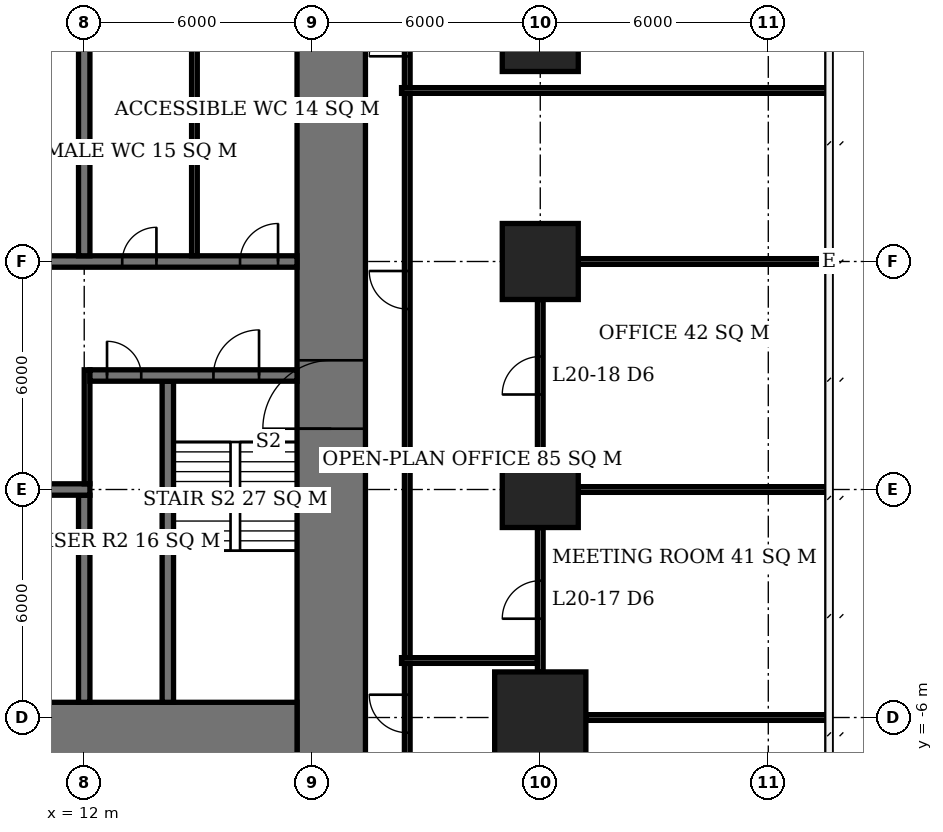
"""IFC4 building model, lengths in metres.
Left out: names, types, materials, properties, quantities, classifications, styles, units other than length and angle.
Written with IfcOpenShell. Run it as: python <this file> out.ifc"""

import sys

from ifc_helpers import new_model, si_unit, direction, frame, frame_2d, origin, origin_2d, place, context, subcontext, project, spatial, rectangle, extrude, element, fill, save


model = new_model("IFC4")
c1 = context("Model", 3, precision=1e-05, world=origin(), true_north=direction((0.0, 1.0)))
c2 = subcontext(c1, "Body", "Model", "MODEL_VIEW")
j1 = project(units=[si_unit("LENGTHUNIT", "METRE"), si_unit("PLANEANGLEUNIT", "RADIAN")], contexts=[c1])
p1 = place(None, origin())
s1 = spatial("IfcSite", under=j1, at=p1, CompositionType="ELEMENT")
p2 = place(p1, origin())
s2 = spatial("IfcBuilding", under=s1, at=p2, CompositionType="ELEMENT")
p3 = place(p2, frame((0.0, 0.0, 84.5)))
s3 = spatial("IfcBuildingStorey", under=s2, at=p3, CompositionType="ELEMENT", Elevation=84.5)
p4 = place(p3, frame((24.0, -6.0, 0.0), z_axis=(0.0, 0.0, 1.0), x_axis=(1.0, 0.0, 0.0)))
e1 = element("IfcColumn", 1, at=p4, inside=s3, PredefinedType="COLUMN", context=c2, shape_type="SweptSolid", body=[
    extrude(rectangle(XDim=2.4, YDim=2.4, at=origin_2d()), origin(), (0.0, 0.0, 1.0), 3.9),
])
for number, where, z_axis, x_axis in (
    (2, (24.0, 0.0, 0.0), (0.0, 0.0, 1.0), (1.0, 0.0, 0.0)),
    (3, (24.0, 6.0, 0.0), (0.0, 0.0, 1.0), (1.0, 0.0, 0.0)),
    (4, (24.0, 12.0, 0.0), (0.0, 0.0, 1.0), (1.0, 0.0, 0.0)),
):
    element("IfcColumn", number, at=place(p3, frame(where, z_axis=z_axis, x_axis=x_axis)), inside=s3, PredefinedType="COLUMN", context=c2, shape_type="SweptSolid", body=[
        extrude(rectangle(XDim=2.0, YDim=2.0, at=origin_2d()), origin(), (0.0, 0.0, 1.0), 3.9),
    ])
p5 = place(p3, frame((-5.6, -6.6, 0.0), z_axis=(0.0, 0.0, 1.0), x_axis=(1.0, 0.0, 0.0)))
e5 = element("IfcWall", 5, at=p5, inside=s3, PredefinedType="SHEAR", context=c2, shape_type="SweptSolid", body=[
    extrude(rectangle(XDim=23.2, YDim=2.0, at=frame_2d((11.6, 0.0))), origin(), (0.0, 0.0, 1.0), 3.9),
])
p6 = place(p3, frame((18.5, -7.6, 0.0), z_axis=(0.0, 0.0, 1.0), x_axis=(0.0, 1.0, 0.0)))
e6 = element("IfcWall", 6, at=p6, inside=s3, PredefinedType="SHEAR", context=c2, shape_type="SweptSolid", body=[
    extrude(rectangle(XDim=21.2, YDim=1.8, at=frame_2d((10.6, 0.0))), origin(), (0.0, 0.0, 1.0), 3.9),
])
p7 = place(p6, frame((9.2, 0.0, 0.0)))
e7 = element("IfcOpeningElement", 7, at=p7, cuts=e6, PredefinedType="OPENING", context=c2, shape_type="SweptSolid", body=[
    extrude(rectangle(XDim=1.8, YDim=2.4, at=frame_2d((0.9, 1.2))), frame((0.0, 0.91, 0.0), z_axis=(0.0, -1.0, 0.0), x_axis=(1.0, 0.0, 0.0)), (0.0, 0.0, 1.0), 1.82),
])
p8 = place(p3, frame((-5.6, 0.0, 0.0), z_axis=(0.0, 0.0, 1.0), x_axis=(1.0, 0.0, 0.0)))
e8 = element("IfcWall", 8, at=p8, inside=s3, PredefinedType="SHEAR", context=c2, shape_type="SweptSolid", body=[
    extrude(rectangle(XDim=17.75, YDim=0.3, at=frame_2d((8.875, 0.0))), origin(), (0.0, 0.0, 1.0), 3.9),
])
p9 = place(p8, frame((0.6, 0.0, 0.0)))
e9 = element("IfcOpeningElement", 9, at=p9, cuts=e8, PredefinedType="OPENING", context=c2, shape_type="SweptSolid", body=[
    extrude(rectangle(XDim=0.9, YDim=2.1, at=frame_2d((0.45, 1.05))), frame((0.0, 0.16, 0.0), z_axis=(0.0, -1.0, 0.0), x_axis=(1.0, 0.0, 0.0)), (0.0, 0.0, 1.0), 0.32),
])
p10 = place(p8, frame((3.7, 0.0, 0.0)))
e10 = element("IfcOpeningElement", 10, at=p10, cuts=e8, PredefinedType="OPENING", context=c2, shape_type="SweptSolid", body=[
    extrude(rectangle(XDim=1.0, YDim=2.1, at=frame_2d((0.5, 1.05))), frame((0.0, 0.16, 0.0), z_axis=(0.0, -1.0, 0.0), x_axis=(1.0, 0.0, 0.0)), (0.0, 0.0, 1.0), 0.32),
])
p11 = place(p3, frame((12.15, 3.0, 0.0), z_axis=(0.0, 0.0, 1.0), x_axis=(1.0, 0.0, 0.0)))
e11 = element("IfcWall", 11, at=p11, inside=s3, PredefinedType="SHEAR", context=c2, shape_type="SweptSolid", body=[
    extrude(rectangle(XDim=5.45, YDim=0.3, at=frame_2d((2.725, 0.0))), origin(), (0.0, 0.0, 1.0), 3.9),
])
p12 = place(p11, frame((3.25, 0.0, 0.0)))
e12 = element("IfcOpeningElement", 12, at=p12, cuts=e11, PredefinedType="OPENING", context=c2, shape_type="SweptSolid", body=[
    extrude(rectangle(XDim=1.2, YDim=2.1, at=frame_2d((0.6, 1.05))), frame((0.0, 0.16, 0.0), z_axis=(0.0, -1.0, 0.0), x_axis=(1.0, 0.0, 0.0)), (0.0, 0.0, 1.0), 0.32),
])
p13 = place(p11, frame((0.45, 0.0, 0.0)))
e13 = element("IfcOpeningElement", 13, at=p13, cuts=e11, PredefinedType="OPENING", context=c2, shape_type="SweptSolid", body=[
    extrude(rectangle(XDim=0.9, YDim=2.1, at=frame_2d((0.45, 1.05))), frame((0.0, 0.16, 0.0), z_axis=(0.0, -1.0, 0.0), x_axis=(1.0, 0.0, 0.0)), (0.0, 0.0, 1.0), 0.32),
])
p14 = place(p3, frame((-0.15, 6.0, 0.0), z_axis=(0.0, 0.0, 1.0), x_axis=(1.0, 0.0, 0.0)))
e14 = element("IfcWall", 14, at=p14, inside=s3, PredefinedType="SHEAR", context=c2, shape_type="SweptSolid", body=[
    extrude(rectangle(XDim=17.75, YDim=0.3, at=frame_2d((8.875, 0.0))), origin(), (0.0, 0.0, 1.0), 3.9),
])
p15 = place(p14, frame((13.15, 0.0, 0.0)))
e15 = element("IfcOpeningElement", 15, at=p15, cuts=e14, PredefinedType="OPENING", context=c2, shape_type="SweptSolid", body=[
    extrude(rectangle(XDim=0.9, YDim=2.1, at=frame_2d((0.45, 1.05))), frame((0.0, 0.16, 0.0), z_axis=(0.0, -1.0, 0.0), x_axis=(1.0, 0.0, 0.0)), (0.0, 0.0, 1.0), 0.32),
])
p16 = place(p14, frame((16.25, 0.0, 0.0)))
e16 = element("IfcOpeningElement", 16, at=p16, cuts=e14, PredefinedType="OPENING", context=c2, shape_type="SweptSolid", body=[
    extrude(rectangle(XDim=1.0, YDim=2.1, at=frame_2d((0.5, 1.05))), frame((0.0, 0.16, 0.0), z_axis=(0.0, -1.0, 0.0), x_axis=(1.0, 0.0, 0.0)), (0.0, 0.0, 1.0), 0.32),
])
p17 = place(p14, frame((1.1, 0.0, 0.0)))
e17 = element("IfcOpeningElement", 17, at=p17, cuts=e14, PredefinedType="OPENING", context=c2, shape_type="SweptSolid", body=[
    extrude(rectangle(XDim=1.1, YDim=2.1, at=frame_2d((0.55, 1.05))), frame((0.0, 0.16, 0.0), z_axis=(0.0, -1.0, 0.0), x_axis=(1.0, 0.0, 0.0)), (0.0, 0.0, 1.0), 0.32),
])
p18 = place(p14, frame((4.1, 0.0, 0.0)))
e18 = element("IfcOpeningElement", 18, at=p18, cuts=e14, PredefinedType="OPENING", context=c2, shape_type="SweptSolid", body=[
    extrude(rectangle(XDim=1.1, YDim=2.1, at=frame_2d((0.55, 1.05))), frame((0.0, 0.16, 0.0), z_axis=(0.0, -1.0, 0.0), x_axis=(1.0, 0.0, 0.0)), (0.0, 0.0, 1.0), 0.32),
])
p19 = place(p14, frame((7.1, 0.0, 0.0)))
e19 = element("IfcOpeningElement", 19, at=p19, cuts=e14, PredefinedType="OPENING", context=c2, shape_type="SweptSolid", body=[
    extrude(rectangle(XDim=1.1, YDim=2.1, at=frame_2d((0.55, 1.05))), frame((0.0, 0.16, 0.0), z_axis=(0.0, -1.0, 0.0), x_axis=(1.0, 0.0, 0.0)), (0.0, 0.0, 1.0), 0.32),
])
p20 = place(p14, frame((10.1, 0.0, 0.0)))
e20 = element("IfcOpeningElement", 20, at=p20, cuts=e14, PredefinedType="OPENING", context=c2, shape_type="SweptSolid", body=[
    extrude(rectangle(XDim=1.1, YDim=2.1, at=frame_2d((0.55, 1.05))), frame((0.0, 0.16, 0.0), z_axis=(0.0, -1.0, 0.0), x_axis=(1.0, 0.0, 0.0)), (0.0, 0.0, 1.0), 0.32),
])
for number, where, z_axis, x_axis in (
    (21, (12.0, -5.6, 0.0), (0.0, 0.0, 1.0), (0.0, 1.0, 0.0)),
    (22, (12.0, 6.15, 0.0), (0.0, 0.0, 1.0), (0.0, 1.0, 0.0)),
):
    element("IfcWall", number, at=place(p3, frame(where, z_axis=z_axis, x_axis=x_axis)), inside=s3, PredefinedType="SHEAR", context=c2, shape_type="SweptSolid", body=[
        extrude(rectangle(XDim=5.45, YDim=0.3, at=frame_2d((2.725, 0.0))), origin(), (0.0, 0.0, 1.0), 3.9),
    ])
p21 = place(p3, frame((14.2, -5.6, 0.0), z_axis=(0.0, 0.0, 1.0), x_axis=(0.0, 1.0, 0.0)))
e23 = element("IfcWall", 23, at=p21, inside=s3, PredefinedType="SHEAR", context=c2, shape_type="SweptSolid", body=[
    extrude(rectangle(XDim=8.45, YDim=0.3, at=frame_2d((4.225, 0.0))), origin(), (0.0, 0.0, 1.0), 3.9),
])
p22 = place(p3, frame((14.9, 6.15, 0.0), z_axis=(0.0, 0.0, 1.0), x_axis=(0.0, 1.0, 0.0)))
e24 = element("IfcWall", 24, at=p22, inside=s3, PredefinedType="PLUMBINGWALL", context=c2, shape_type="SweptSolid", body=[
    extrude(rectangle(XDim=5.45, YDim=0.15, at=frame_2d((2.725, 0.0))), origin(), (0.0, 0.0, 1.0), 3.65),
])
p23 = place(p3, frame((25.2, -6.0, 0.0), z_axis=(0.0, 0.0, 1.0), x_axis=(1.0, 0.0, 0.0)))
e25 = element("IfcWall", 25, at=p23, inside=s3, PredefinedType="PARTITIONING", context=c2, shape_type="SweptSolid", body=[
    extrude(rectangle(XDim=6.4, YDim=0.15, at=frame_2d((3.2, 0.0))), origin(), (0.0, 0.0, 1.0), 3.65),
])
p24 = place(p3, frame((25.0, 0.0, 0.0), z_axis=(0.0, 0.0, 1.0), x_axis=(1.0, 0.0, 0.0)))
e26 = element("IfcWall", 26, at=p24, inside=s3, PredefinedType="PARTITIONING", context=c2, shape_type="SweptSolid", body=[
    extrude(rectangle(XDim=6.6, YDim=0.15, at=frame_2d((3.3, 0.0))), origin(), (0.0, 0.0, 1.0), 3.65),
])
p25 = place(p3, frame((25.0, 6.0, 0.0), z_axis=(0.0, 0.0, 1.0), x_axis=(1.0, 0.0, 0.0)))
e27 = element("IfcWall", 27, at=p25, inside=s3, PredefinedType="PARTITIONING", context=c2, shape_type="SweptSolid", body=[
    extrude(rectangle(XDim=6.55, YDim=0.15, at=frame_2d((3.275, 0.0))), origin(), (0.0, 0.0, 1.0), 3.65),
])
p26 = place(p3, frame((24.0, -4.8, 0.0), z_axis=(0.0, 0.0, 1.0), x_axis=(0.0, 1.0, 0.0)))
e28 = element("IfcWall", 28, at=p26, inside=s3, PredefinedType="PARTITIONING", context=c2, shape_type="SweptSolid", body=[
    extrude(rectangle(XDim=3.8, YDim=0.15, at=frame_2d((1.9, 0.0))), origin(), (0.0, 0.0, 1.0), 3.65),
])
p27 = place(p26, frame((1.4, 0.0, 0.0)))
e29 = element("IfcOpeningElement", 29, at=p27, cuts=e28, PredefinedType="OPENING", context=c2, shape_type="SweptSolid", body=[
    extrude(rectangle(XDim=1.0, YDim=2.1, at=frame_2d((0.5, 1.05))), frame((0.0, 0.085, 0.0), z_axis=(0.0, -1.0, 0.0), x_axis=(1.0, 0.0, 0.0)), (0.0, 0.0, 1.0), 0.17),
])
p28 = place(p3, frame((24.0, 1.0, 0.0), z_axis=(0.0, 0.0, 1.0), x_axis=(0.0, 1.0, 0.0)))
e30 = element("IfcWall", 30, at=p28, inside=s3, PredefinedType="PARTITIONING", context=c2, shape_type="SweptSolid", body=[
    extrude(rectangle(XDim=4.0, YDim=0.15, at=frame_2d((2.0, 0.0))), origin(), (0.0, 0.0, 1.0), 3.65),
])
p29 = place(p28, frame((1.5, 0.0, 0.0)))
e31 = element("IfcOpeningElement", 31, at=p29, cuts=e30, PredefinedType="OPENING", context=c2, shape_type="SweptSolid", body=[
    extrude(rectangle(XDim=1.0, YDim=2.1, at=frame_2d((0.5, 1.05))), frame((0.0, 0.085, 0.0), z_axis=(0.0, -1.0, 0.0), x_axis=(1.0, 0.0, 0.0)), (0.0, 0.0, 1.0), 0.17),
])
p30 = place(p3, frame((20.5, -8.425, 0.0), z_axis=(0.0, 0.0, 1.0), x_axis=(0.0, 1.0, 0.0)))
e32 = element("IfcWall", 32, at=p30, inside=s3, PredefinedType="PARTITIONING", context=c2, shape_type="SweptSolid", body=[
    extrude(rectangle(XDim=3.85, YDim=0.15, at=frame_2d((1.925, 0.0))), origin(), (0.0, 0.0, 1.0), 3.65),
])
p31 = place(p30, frame((2.025, 0.0, 0.0)))
e33 = element("IfcOpeningElement", 33, at=p31, cuts=e32, PredefinedType="OPENING", context=c2, shape_type="SweptSolid", body=[
    extrude(rectangle(XDim=1.0, YDim=2.1, at=frame_2d((0.5, 1.05))), frame((0.0, 0.085, 0.0), z_axis=(0.0, -1.0, 0.0), x_axis=(1.0, 0.0, 0.0)), (0.0, 0.0, 1.0), 0.17),
])
p32 = place(p3, frame((20.5, -4.425, 0.0), z_axis=(0.0, 0.0, 1.0), x_axis=(0.0, 1.0, 0.0)))
e34 = element("IfcWall", 34, at=p32, inside=s3, PredefinedType="PARTITIONING", context=c2, shape_type="SweptSolid", body=[
    extrude(rectangle(XDim=14.85, YDim=0.15, at=frame_2d((7.425, 0.0))), origin(), (0.0, 0.0, 1.0), 3.65),
])
p33 = place(p32, frame((9.175, 0.0, 0.0)))
e35 = element("IfcOpeningElement", 35, at=p33, cuts=e34, PredefinedType="OPENING", context=c2, shape_type="SweptSolid", body=[
    extrude(rectangle(XDim=1.0, YDim=2.1, at=frame_2d((0.5, 1.05))), frame((0.0, 0.085, 0.0), z_axis=(0.0, -1.0, 0.0), x_axis=(1.0, 0.0, 0.0)), (0.0, 0.0, 1.0), 0.17),
])
p34 = place(p3, frame((20.35, -4.5, 0.0), z_axis=(0.0, 0.0, 1.0), x_axis=(1.0, 0.0, 0.0)))
e36 = element("IfcWall", 36, at=p34, inside=s3, PredefinedType="PARTITIONING", context=c2, shape_type="SweptSolid", body=[
    extrude(rectangle(XDim=3.575, YDim=0.15, at=frame_2d((1.788, 0.0))), origin(), (0.0, 0.0, 1.0), 3.65),
])
p35 = place(p3, frame((20.5, 10.575, 0.0), z_axis=(0.0, 0.0, 1.0), x_axis=(0.0, 1.0, 0.0)))
e37 = element("IfcWall", 37, at=p35, inside=s3, PredefinedType="PARTITIONING", context=c2, shape_type="SweptSolid", body=[
    extrude(rectangle(XDim=3.85, YDim=0.15, at=frame_2d((1.925, 0.0))), origin(), (0.0, 0.0, 1.0), 3.65),
])
p36 = place(p35, frame((0.825, 0.0, 0.0)))
e38 = element("IfcOpeningElement", 38, at=p36, cuts=e37, PredefinedType="OPENING", context=c2, shape_type="SweptSolid", body=[
    extrude(rectangle(XDim=1.0, YDim=2.1, at=frame_2d((0.5, 1.05))), frame((0.0, 0.085, 0.0), z_axis=(0.0, -1.0, 0.0), x_axis=(1.0, 0.0, 0.0)), (0.0, 0.0, 1.0), 0.17),
])
p37 = place(p3, frame((20.35, 10.5, 0.0), z_axis=(0.0, 0.0, 1.0), x_axis=(1.0, 0.0, 0.0)))
e39 = element("IfcWall", 39, at=p37, inside=s3, PredefinedType="PARTITIONING", context=c2, shape_type="SweptSolid", body=[
    extrude(rectangle(XDim=11.25, YDim=0.15, at=frame_2d((5.625, 0.0))), origin(), (0.0, 0.0, 1.0), 3.65),
])
p38 = place(p3, frame((12.075, 0.15, 0.0), z_axis=(0.0, 0.0, 1.0), x_axis=(0.0, 1.0, 0.0)))
e40 = element("IfcWall", 40, at=p38, inside=s3, PredefinedType="PARTITIONING", context=c2, shape_type="SweptSolid", body=[
    extrude(rectangle(XDim=3.0, YDim=0.15, at=frame_2d((1.5, 0.0))), origin(), (0.0, 0.0, 1.0), 3.65),
])
p39 = place(p7, origin())
e41 = element("IfcDoor", 41, at=p39, inside=s3, OperationType="DOUBLE_DOOR_SINGLE_SWING", PredefinedType="DOOR", context=c2, shape_type="SweptSolid", body=[
    extrude(rectangle(XDim=1.8, YDim=2.4, at=frame_2d((0.9, 1.2))), frame((0.0, 0.025, 0.0), z_axis=(0.0, -1.0, 0.0), x_axis=(1.0, 0.0, 0.0)), (0.0, 0.0, 1.0), 0.05),
])
fill(e7, e41)
p40 = place(p12, origin())
e42 = element("IfcDoor", 42, at=p40, inside=s3, OperationType="SINGLE_SWING_RIGHT", PredefinedType="DOOR", context=c2, shape_type="SweptSolid", body=[
    extrude(rectangle(XDim=1.2, YDim=2.1, at=frame_2d((0.6, 1.05))), frame((0.0, 0.025, 0.0), z_axis=(0.0, -1.0, 0.0), x_axis=(1.0, 0.0, 0.0)), (0.0, 0.0, 1.0), 0.05),
])
fill(e12, e42)
p41 = place(p13, origin())
e43 = element("IfcDoor", 43, at=p41, inside=s3, OperationType="SINGLE_SWING_LEFT", PredefinedType="DOOR", context=c2, shape_type="SweptSolid", body=[
    extrude(rectangle(XDim=0.9, YDim=2.1, at=frame_2d((0.45, 1.05))), frame((0.0, 0.025, 0.0), z_axis=(0.0, -1.0, 0.0), x_axis=(1.0, 0.0, 0.0)), (0.0, 0.0, 1.0), 0.05),
])
fill(e13, e43)
p42 = place(p15, origin())
e44 = element("IfcDoor", 44, at=p42, inside=s3, OperationType="SINGLE_SWING_RIGHT", PredefinedType="DOOR", context=c2, shape_type="SweptSolid", body=[
    extrude(rectangle(XDim=0.9, YDim=2.1, at=frame_2d((0.45, 1.05))), frame((0.0, 0.025, 0.0), z_axis=(0.0, -1.0, 0.0), x_axis=(1.0, 0.0, 0.0)), (0.0, 0.0, 1.0), 0.05),
])
fill(e15, e44)
p43 = place(p16, origin())
e45 = element("IfcDoor", 45, at=p43, inside=s3, OperationType="SINGLE_SWING_RIGHT", PredefinedType="DOOR", context=c2, shape_type="SweptSolid", body=[
    extrude(rectangle(XDim=1.0, YDim=2.1, at=frame_2d((0.5, 1.05))), frame((0.0, 0.025, 0.0), z_axis=(0.0, -1.0, 0.0), x_axis=(1.0, 0.0, 0.0)), (0.0, 0.0, 1.0), 0.05),
])
fill(e16, e45)
p44 = place(p27, origin())
e46 = element("IfcDoor", 46, at=p44, inside=s3, OperationType="SINGLE_SWING_LEFT", PredefinedType="DOOR", context=c2, shape_type="SweptSolid", body=[
    extrude(rectangle(XDim=1.0, YDim=2.1, at=frame_2d((0.5, 1.05))), frame((0.0, 0.025, 0.0), z_axis=(0.0, -1.0, 0.0), x_axis=(1.0, 0.0, 0.0)), (0.0, 0.0, 1.0), 0.05),
])
fill(e29, e46)
p45 = place(p29, origin())
e47 = element("IfcDoor", 47, at=p45, inside=s3, OperationType="SINGLE_SWING_LEFT", PredefinedType="DOOR", context=c2, shape_type="SweptSolid", body=[
    extrude(rectangle(XDim=1.0, YDim=2.1, at=frame_2d((0.5, 1.05))), frame((0.0, 0.025, 0.0), z_axis=(0.0, -1.0, 0.0), x_axis=(1.0, 0.0, 0.0)), (0.0, 0.0, 1.0), 0.05),
])
fill(e31, e47)
p46 = place(p31, origin())
e48 = element("IfcDoor", 48, at=p46, inside=s3, OperationType="SINGLE_SWING_RIGHT", PredefinedType="DOOR", context=c2, shape_type="SweptSolid", body=[
    extrude(rectangle(XDim=1.0, YDim=2.1, at=frame_2d((0.5, 1.05))), frame((0.0, 0.025, 0.0), z_axis=(0.0, -1.0, 0.0), x_axis=(1.0, 0.0, 0.0)), (0.0, 0.0, 1.0), 0.05),
])
fill(e33, e48)
p47 = place(p33, origin())
e49 = element("IfcDoor", 49, at=p47, inside=s3, OperationType="SINGLE_SWING_RIGHT", PredefinedType="DOOR", context=c2, shape_type="SweptSolid", body=[
    extrude(rectangle(XDim=1.0, YDim=2.1, at=frame_2d((0.5, 1.05))), frame((0.0, 0.025, 0.0), z_axis=(0.0, -1.0, 0.0), x_axis=(1.0, 0.0, 0.0)), (0.0, 0.0, 1.0), 0.05),
])
fill(e35, e49)
p48 = place(p36, origin())
e50 = element("IfcDoor", 50, at=p48, inside=s3, OperationType="SINGLE_SWING_LEFT", PredefinedType="DOOR", context=c2, shape_type="SweptSolid", body=[
    extrude(rectangle(XDim=1.0, YDim=2.1, at=frame_2d((0.5, 1.05))), frame((0.0, 0.025, 0.0), z_axis=(0.0, -1.0, 0.0), x_axis=(1.0, 0.0, 0.0)), (0.0, 0.0, 1.0), 0.05),
])
fill(e38, e50)
save(model, sys.argv[1])
